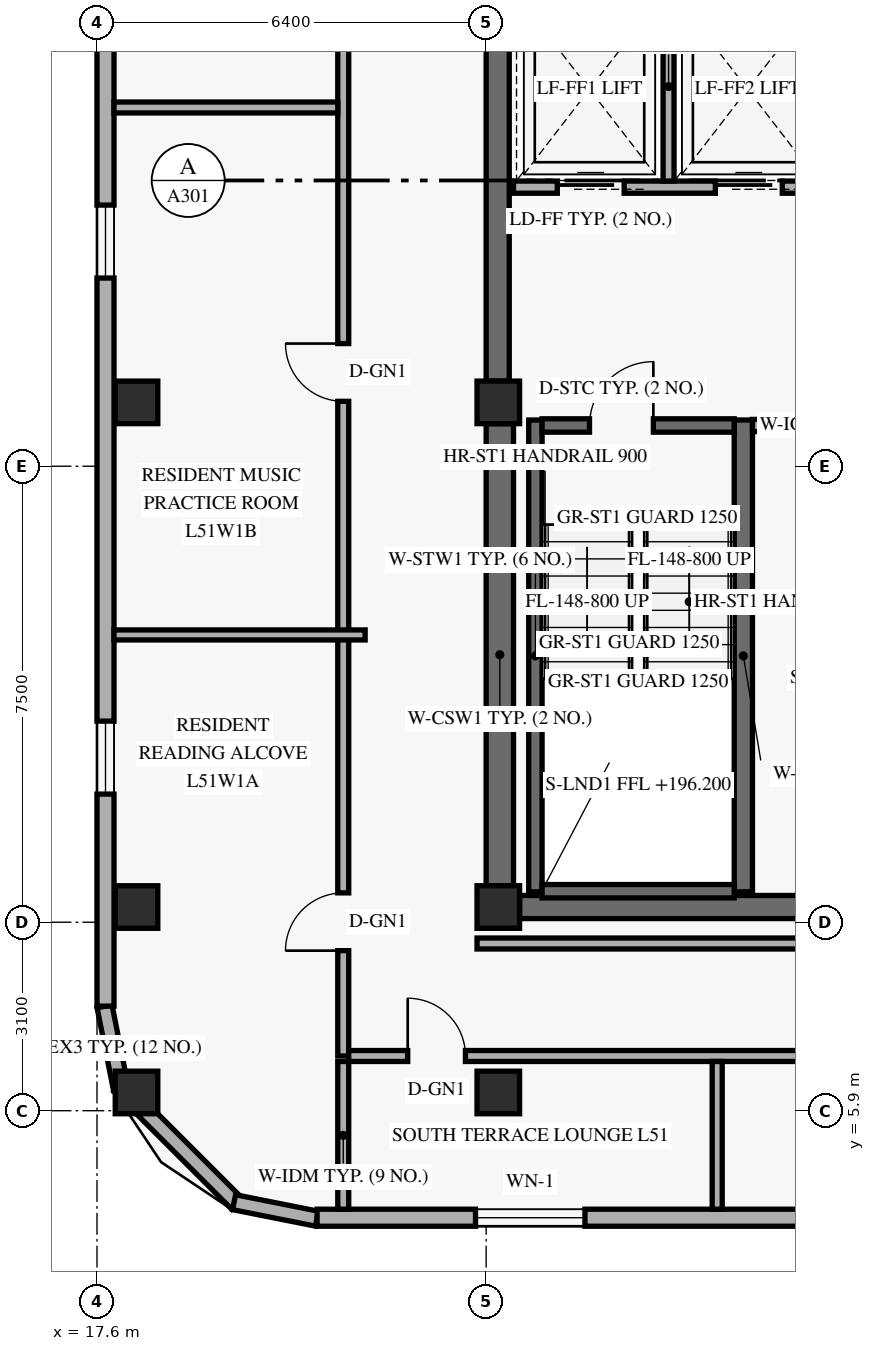
"""IFC4 building model, lengths in metres.
Left out: names, types, materials, properties, quantities, classifications, styles, units other than length and angle.
Written with IfcOpenShell. Run it as: python <this file> out.ifc"""

import sys

from ifc_helpers import new_model, si_unit, direction, frame, frame_2d, origin, origin_2d, place, context, subcontext, project, spatial, rectangle, extrude, element, fill, save


model = new_model("IFC4")
c1 = context("Model", 3, precision=1e-05, world=origin(), true_north=direction((0.0, 1.0)))
c2 = subcontext(c1, "Body", "Model", "MODEL_VIEW")
j1 = project(units=[si_unit("LENGTHUNIT", "METRE"), si_unit("PLANEANGLEUNIT", "RADIAN")], contexts=[c1])
p1 = place(None, origin())
s1 = spatial("IfcSite", under=j1, at=p1, CompositionType="ELEMENT")
p2 = place(p1, origin())
s2 = spatial("IfcBuilding", under=s1, at=p2, CompositionType="ELEMENT")
p3 = place(p2, frame((0.0, 0.0, 196.2)))
s3 = spatial("IfcBuildingStorey", under=s2, at=p3, CompositionType="ELEMENT", Elevation=196.2)
p4 = place(p3, frame((24.225, 9.6, 0.0), z_axis=(0.0, 0.0, 1.0), x_axis=(0.0, 1.0, 0.0)))
e1 = element("IfcWall", 1, at=p4, inside=s3, PredefinedType="SHEAR", context=c2, shape_type="SweptSolid", body=[
    extrude(rectangle(XDim=7.6, YDim=0.45, at=frame_2d((3.8, 0.0))), origin(), (0.0, 0.0, 1.0), 2.688),
])
p5 = place(p3, frame((24.19, 17.9, 0.0), z_axis=(0.0, 0.0, 1.0), x_axis=(0.0, 1.0, 0.0)))
e2 = element("IfcWall", 2, at=p5, inside=s3, PredefinedType="SHEAR", context=c2, shape_type="SweptSolid", body=[
    extrude(rectangle(XDim=11.95, YDim=0.38, at=frame_2d((5.975, 0.0))), origin(), (0.0, 0.0, 1.0), 2.688),
])
p6 = place(p3, frame((24.55, 9.25, 0.0), z_axis=(0.0, 0.0, 1.0), x_axis=(1.0, 0.0, 0.0)))
e3 = element("IfcWall", 3, at=p6, inside=s3, PredefinedType="SHEAR", context=c2, shape_type="SweptSolid", body=[
    extrude(rectangle(XDim=10.3, YDim=0.38, at=frame_2d((5.15, 0.0))), origin(), (0.0, 0.0, 1.0), 3.3),
])
p7 = place(p6, frame((5.2, 0.0, 0.0)))
e4 = element("IfcOpeningElement", 4, at=p7, cuts=e3, PredefinedType="OPENING", context=c2, shape_type="SweptSolid", body=[
    extrude(rectangle(XDim=1.05, YDim=2.15, at=frame_2d((0.525, 1.075))), frame((0.0, 0.2, 0.0), z_axis=(0.0, -1.0, 0.0), x_axis=(1.0, 0.0, 0.0)), (0.0, 0.0, 1.0), 0.4),
])
p8 = place(p3, frame((24.81, 9.5, 0.0), z_axis=(0.0, 0.0, 1.0), x_axis=(0.0, 1.0, 0.0)))
e5 = element("IfcWall", 5, at=p8, inside=s3, PredefinedType="SHEAR", context=c2, shape_type="SweptSolid", body=[
    extrude(rectangle(XDim=7.76, YDim=0.22, at=frame_2d((3.88, 0.0))), origin(), (0.0, 0.0, 1.0), 3.3),
])
p9 = place(p3, frame((28.23, 9.5, 0.0), z_axis=(0.0, 0.0, 1.0), x_axis=(0.0, 1.0, 0.0)))
e6 = element("IfcWall", 6, at=p9, inside=s3, PredefinedType="SHEAR", context=c2, shape_type="SweptSolid", body=[
    extrude(rectangle(XDim=7.76, YDim=0.3, at=frame_2d((3.88, 0.0))), origin(), (0.0, 0.0, 1.0), 3.3),
])
p10 = place(p3, frame((24.92, 9.51, 0.0), z_axis=(0.0, 0.0, 1.0), x_axis=(1.0, 0.0, 0.0)))
e7 = element("IfcWall", 7, at=p10, inside=s3, PredefinedType="SHEAR", context=c2, shape_type="SweptSolid", body=[
    extrude(rectangle(XDim=3.16, YDim=0.22, at=frame_2d((1.58, 0.0))), origin(), (0.0, 0.0, 1.0), 3.3),
])
p11 = place(p3, frame((24.92, 17.17, 0.0), z_axis=(0.0, 0.0, 1.0), x_axis=(1.0, 0.0, 0.0)))
e8 = element("IfcWall", 8, at=p11, inside=s3, PredefinedType="SHEAR", context=c2, shape_type="SweptSolid", body=[
    extrude(rectangle(XDim=3.16, YDim=0.22, at=frame_2d((1.58, 0.0))), origin(), (0.0, 0.0, 1.0), 3.3),
])
p12 = place(p11, frame((0.78, 0.0, 0.0)))
e9 = element("IfcOpeningElement", 9, at=p12, cuts=e8, PredefinedType="OPENING", context=c2, shape_type="SweptSolid", body=[
    extrude(rectangle(XDim=1.05, YDim=2.15, at=frame_2d((0.525, 1.075))), frame((0.0, 0.12, 0.0), z_axis=(0.0, -1.0, 0.0), x_axis=(1.0, 0.0, 0.0)), (0.0, 0.0, 1.0), 0.24),
])
for number, where, z_axis, x_axis in (
    (10, (18.25, 6.2, 0.0), (0.0, 0.0, 1.0), (1.0, 0.0, 0.0)),
    (11, (18.25, 9.25, 0.0), (0.0, 0.0, 1.0), (1.0, 0.0, 0.0)),
    (12, (18.25, 17.55, 0.0), (0.0, 0.0, 1.0), (1.0, 0.0, 0.0)),
    (13, (24.2, 6.2, 0.0), (0.0, 0.0, 1.0), (1.0, 0.0, 0.0)),
    (14, (24.2, 9.25, 0.0), (0.0, 0.0, 1.0), (1.0, 0.0, 0.0)),
    (15, (24.2, 17.55, 0.0), (0.0, 0.0, 1.0), (1.0, 0.0, 0.0)),
):
    element("IfcColumn", number, at=place(p3, frame(where, z_axis=z_axis, x_axis=x_axis)), inside=s3, PredefinedType="COLUMN", context=c2, shape_type="SweptSolid", body=[
        extrude(rectangle(XDim=0.7, YDim=0.7, at=origin_2d()), origin(), (0.0, 0.0, 1.0), 3.6),
    ])
p13 = place(p3, frame((17.724, 7.616, 0.0), z_axis=(0.0, 0.0, 1.0), x_axis=(0.195135625965, -0.9807762678, 0.0)))
e16 = element("IfcWall", 16, at=p13, inside=s3, PredefinedType="SOLIDWALL", context=c2, shape_type="SweptSolid", body=[
    extrude(rectangle(XDim=1.389, YDim=0.25, at=frame_2d((0.694, 0.0))), origin(), (0.0, 0.0, 1.0), 3.3),
])
p14 = place(p3, frame((17.968, 6.305, 0.0), z_axis=(0.0, 0.0, 1.0), x_axis=(0.707106781187, -0.707106781187, 0.0)))
e17 = element("IfcWall", 17, at=p14, inside=s3, PredefinedType="SOLIDWALL", context=c2, shape_type="SweptSolid", body=[
    extrude(rectangle(XDim=2.739, YDim=0.25, at=frame_2d((1.37, 0.0))), origin(), (0.0, 0.0, 1.0), 3.3),
])
p15 = place(p3, frame((19.854, 4.395, 0.0), z_axis=(0.0, 0.0, 1.0), x_axis=(0.980809899341, -0.19496651342, 0.0)))
e18 = element("IfcWall", 18, at=p15, inside=s3, PredefinedType="SOLIDWALL", context=c2, shape_type="SweptSolid", body=[
    extrude(rectangle(XDim=1.389, YDim=0.25, at=frame_2d((0.694, 0.0))), origin(), (0.0, 0.0, 1.0), 3.3),
])
p16 = place(p3, frame((21.22, 4.14, 0.0), z_axis=(0.0, 0.0, 1.0), x_axis=(1.0, 0.0, 0.0)))
e19 = element("IfcWall", 19, at=p16, inside=s3, PredefinedType="SOLIDWALL", context=c2, shape_type="SweptSolid", body=[
    extrude(rectangle(XDim=33.76, YDim=0.28, at=frame_2d((16.88, 0.0))), origin(), (0.0, 0.0, 1.0), 3.3),
])
p17 = place(p16, frame((2.605, 0.0, 0.85)))
e20 = element("IfcOpeningElement", 20, at=p17, cuts=e19, PredefinedType="OPENING", context=c2, shape_type="SweptSolid", body=[
    extrude(rectangle(XDim=1.8, YDim=1.6, at=frame_2d((0.9, 0.8))), frame((0.0, 0.15, 0.0), z_axis=(0.0, -1.0, 0.0), x_axis=(1.0, 0.0, 0.0)), (0.0, 0.0, 1.0), 0.3),
])
p18 = place(p16, frame((9.49, 0.0, 0.85)))
e21 = element("IfcOpeningElement", 21, at=p18, cuts=e19, PredefinedType="OPENING", context=c2, shape_type="SweptSolid", body=[
    extrude(rectangle(XDim=1.8, YDim=1.6, at=frame_2d((0.9, 0.8))), frame((0.0, 0.15, 0.0), z_axis=(0.0, -1.0, 0.0), x_axis=(1.0, 0.0, 0.0)), (0.0, 0.0, 1.0), 0.3),
])
p19 = place(p16, frame((14.765, 0.0, 0.85)))
e22 = element("IfcOpeningElement", 22, at=p19, cuts=e19, PredefinedType="OPENING", context=c2, shape_type="SweptSolid", body=[
    extrude(rectangle(XDim=1.8, YDim=1.6, at=frame_2d((0.9, 0.8))), frame((0.0, 0.15, 0.0), z_axis=(0.0, -1.0, 0.0), x_axis=(1.0, 0.0, 0.0)), (0.0, 0.0, 1.0), 0.3),
])
p20 = place(p16, frame((19.16, 0.0, 0.85)))
e23 = element("IfcOpeningElement", 23, at=p20, cuts=e19, PredefinedType="OPENING", context=c2, shape_type="SweptSolid", body=[
    extrude(rectangle(XDim=1.8, YDim=1.6, at=frame_2d((0.9, 0.8))), frame((0.0, 0.15, 0.0), z_axis=(0.0, -1.0, 0.0), x_axis=(1.0, 0.0, 0.0)), (0.0, 0.0, 1.0), 0.3),
])
p21 = place(p16, frame((24.585, 0.0, 0.85)))
e24 = element("IfcOpeningElement", 24, at=p21, cuts=e19, PredefinedType="OPENING", context=c2, shape_type="SweptSolid", body=[
    extrude(rectangle(XDim=1.8, YDim=1.6, at=frame_2d((0.9, 0.8))), frame((0.0, 0.15, 0.0), z_axis=(0.0, -1.0, 0.0), x_axis=(1.0, 0.0, 0.0)), (0.0, 0.0, 1.0), 0.3),
])
p22 = place(p16, frame((28.28, 0.0, 0.85)))
e25 = element("IfcOpeningElement", 25, at=p22, cuts=e19, PredefinedType="OPENING", context=c2, shape_type="SweptSolid", body=[
    extrude(rectangle(XDim=1.2, YDim=1.5, at=frame_2d((0.6, 0.75))), frame((0.0, 0.15, 0.0), z_axis=(0.0, -1.0, 0.0), x_axis=(1.0, 0.0, 0.0)), (0.0, 0.0, 1.0), 0.3),
])
p23 = place(p16, frame((30.87, 0.0, 0.85)))
e26 = element("IfcOpeningElement", 26, at=p23, cuts=e19, PredefinedType="OPENING", context=c2, shape_type="SweptSolid", body=[
    extrude(rectangle(XDim=1.8, YDim=1.6, at=frame_2d((0.9, 0.8))), frame((0.0, 0.15, 0.0), z_axis=(0.0, -1.0, 0.0), x_axis=(1.0, 0.0, 0.0)), (0.0, 0.0, 1.0), 0.3),
])
p24 = place(p3, frame((17.74, 40.38, 0.0), z_axis=(0.0, 0.0, 1.0), x_axis=(0.0, -1.0, 0.0)))
e27 = element("IfcWall", 27, at=p24, inside=s3, PredefinedType="SOLIDWALL", context=c2, shape_type="SweptSolid", body=[
    extrude(rectangle(XDim=32.76, YDim=0.28, at=frame_2d((16.38, 0.0))), origin(), (0.0, 0.0, 1.0), 3.3),
])
p25 = place(p24, frame((28.073, 0.0, 0.85)))
e28 = element("IfcOpeningElement", 28, at=p25, cuts=e27, PredefinedType="OPENING", context=c2, shape_type="SweptSolid", body=[
    extrude(rectangle(XDim=1.2, YDim=1.5, at=frame_2d((0.6, 0.75))), frame((0.0, 0.15, 0.0), z_axis=(0.0, -1.0, 0.0), x_axis=(1.0, 0.0, 0.0)), (0.0, 0.0, 1.0), 0.3),
])
p26 = place(p24, frame((19.585, 0.0, 0.85)))
e29 = element("IfcOpeningElement", 29, at=p26, cuts=e27, PredefinedType="OPENING", context=c2, shape_type="SweptSolid", body=[
    extrude(rectangle(XDim=1.2, YDim=1.5, at=frame_2d((0.6, 0.75))), frame((0.0, 0.15, 0.0), z_axis=(0.0, -1.0, 0.0), x_axis=(1.0, 0.0, 0.0)), (0.0, 0.0, 1.0), 0.3),
])
p27 = place(p24, frame((13.7, 0.0, 0.85)))
e30 = element("IfcOpeningElement", 30, at=p27, cuts=e27, PredefinedType="OPENING", context=c2, shape_type="SweptSolid", body=[
    extrude(rectangle(XDim=1.2, YDim=1.5, at=frame_2d((0.6, 0.75))), frame((0.0, 0.15, 0.0), z_axis=(0.0, -1.0, 0.0), x_axis=(1.0, 0.0, 0.0)), (0.0, 0.0, 1.0), 0.3),
])
p28 = place(p24, frame((4.288, 0.0, 0.85)))
e31 = element("IfcOpeningElement", 31, at=p28, cuts=e27, PredefinedType="OPENING", context=c2, shape_type="SweptSolid", body=[
    extrude(rectangle(XDim=1.2, YDim=1.5, at=frame_2d((0.6, 0.75))), frame((0.0, 0.15, 0.0), z_axis=(0.0, -1.0, 0.0), x_axis=(1.0, 0.0, 0.0)), (0.0, 0.0, 1.0), 0.3),
])
p29 = place(p3, frame((24.45, 21.09, 0.0), z_axis=(0.0, 0.0, 1.0), x_axis=(1.0, 0.0, 0.0)))
e32 = element("IfcWall", 32, at=p29, inside=s3, PredefinedType="STANDARD", context=c2, shape_type="SweptSolid", body=[
    extrude(rectangle(XDim=6.83, YDim=0.2, at=frame_2d((3.415, 0.0))), origin(), (0.0, 0.0, 1.0), 3.3),
])
p30 = place(p29, frame((0.72, 0.0, 0.0)))
e33 = element("IfcOpeningElement", 33, at=p30, cuts=e32, PredefinedType="OPENING", context=c2, shape_type="SweptSolid", body=[
    extrude(rectangle(XDim=1.1, YDim=2.2, at=frame_2d((0.55, 1.1))), frame((0.0, 0.11, 0.0), z_axis=(0.0, -1.0, 0.0), x_axis=(1.0, 0.0, 0.0)), (0.0, 0.0, 1.0), 0.22),
])
p31 = place(p29, frame((3.32, 0.0, 0.0)))
e34 = element("IfcOpeningElement", 34, at=p31, cuts=e32, PredefinedType="OPENING", context=c2, shape_type="SweptSolid", body=[
    extrude(rectangle(XDim=1.1, YDim=2.2, at=frame_2d((0.55, 1.1))), frame((0.0, 0.11, 0.0), z_axis=(0.0, -1.0, 0.0), x_axis=(1.0, 0.0, 0.0)), (0.0, 0.0, 1.0), 0.22),
])
p32 = place(p3, frame((28.38, 17.17, 0.0), z_axis=(0.0, 0.0, 1.0), x_axis=(1.0, 0.0, 0.0)))
e35 = element("IfcWall", 35, at=p32, inside=s3, PredefinedType="STANDARD", context=c2, shape_type="SweptSolid", body=[
    extrude(rectangle(XDim=2.9, YDim=0.2, at=frame_2d((1.45, 0.0))), origin(), (0.0, 0.0, 1.0), 3.3),
])
p33 = place(p3, frame((27.0, 21.19, 0.0), z_axis=(0.0, 0.0, 1.0), x_axis=(0.0, 1.0, 0.0)))
e36 = element("IfcWall", 36, at=p33, inside=s3, PredefinedType="STANDARD", context=c2, shape_type="SweptSolid", body=[
    extrude(rectangle(XDim=3.11, YDim=0.18, at=frame_2d((1.555, 0.0))), origin(), (0.0, 0.0, 1.0), 3.3),
])
p34 = place(p3, frame((21.65, 6.8, 0.0), z_axis=(0.0, 0.0, 1.0), x_axis=(0.0, 1.0, 0.0)))
e37 = element("IfcWall", 37, at=p34, inside=s3, PredefinedType="STANDARD", context=c2, shape_type="SweptSolid", body=[
    extrude(rectangle(XDim=34.4, YDim=0.18, at=frame_2d((17.2, 0.0))), origin(), (0.0, 0.0, 1.0), 2.67),
])
p35 = place(p34, frame((1.732, 0.0, 0.0)))
e38 = element("IfcOpeningElement", 38, at=p35, cuts=e37, PredefinedType="OPENING", context=c2, shape_type="SweptSolid", body=[
    extrude(rectangle(XDim=0.95, YDim=2.15, at=frame_2d((0.475, 1.075))), frame((0.0, 0.1, 0.0), z_axis=(0.0, -1.0, 0.0), x_axis=(1.0, 0.0, 0.0)), (0.0, 0.0, 1.0), 0.2),
])
p36 = place(p34, frame((10.768, 0.0, 0.0)))
e39 = element("IfcOpeningElement", 39, at=p36, cuts=e37, PredefinedType="OPENING", context=c2, shape_type="SweptSolid", body=[
    extrude(rectangle(XDim=0.95, YDim=2.15, at=frame_2d((0.475, 1.075))), frame((0.0, 0.1, 0.0), z_axis=(0.0, -1.0, 0.0), x_axis=(1.0, 0.0, 0.0)), (0.0, 0.0, 1.0), 0.2),
])
p37 = place(p34, frame((20.333, 0.0, 0.0)))
e40 = element("IfcOpeningElement", 40, at=p37, cuts=e37, PredefinedType="OPENING", context=c2, shape_type="SweptSolid", body=[
    extrude(rectangle(XDim=0.95, YDim=2.15, at=frame_2d((0.475, 1.075))), frame((0.0, 0.1, 0.0), z_axis=(0.0, -1.0, 0.0), x_axis=(1.0, 0.0, 0.0)), (0.0, 0.0, 1.0), 0.2),
])
p38 = place(p34, frame((30.968, 0.0, 0.0)))
e41 = element("IfcOpeningElement", 41, at=p38, cuts=e37, PredefinedType="OPENING", context=c2, shape_type="SweptSolid", body=[
    extrude(rectangle(XDim=0.95, YDim=2.15, at=frame_2d((0.475, 1.075))), frame((0.0, 0.1, 0.0), z_axis=(0.0, -1.0, 0.0), x_axis=(1.0, 0.0, 0.0)), (0.0, 0.0, 1.0), 0.2),
])
p39 = place(p3, frame((21.74, 6.8, 0.0), z_axis=(0.0, 0.0, 1.0), x_axis=(1.0, 0.0, 0.0)))
e42 = element("IfcWall", 42, at=p39, inside=s3, PredefinedType="STANDARD", context=c2, shape_type="SweptSolid", body=[
    extrude(rectangle(XDim=13.68, YDim=0.18, at=frame_2d((6.84, 0.0))), origin(), (0.0, 0.0, 1.0), 2.67),
])
p40 = place(p39, frame((0.97, 0.0, 0.0)))
e43 = element("IfcOpeningElement", 43, at=p40, cuts=e42, PredefinedType="OPENING", context=c2, shape_type="SweptSolid", body=[
    extrude(rectangle(XDim=0.95, YDim=2.15, at=frame_2d((0.475, 1.075))), frame((0.0, 0.1, 0.0), z_axis=(0.0, -1.0, 0.0), x_axis=(1.0, 0.0, 0.0)), (0.0, 0.0, 1.0), 0.2),
])
p41 = place(p39, frame((9.11, 0.0, 0.0)))
e44 = element("IfcOpeningElement", 44, at=p41, cuts=e42, PredefinedType="OPENING", context=c2, shape_type="SweptSolid", body=[
    extrude(rectangle(XDim=0.95, YDim=2.15, at=frame_2d((0.475, 1.075))), frame((0.0, 0.1, 0.0), z_axis=(0.0, -1.0, 0.0), x_axis=(1.0, 0.0, 0.0)), (0.0, 0.0, 1.0), 0.2),
])
p42 = place(p3, frame((23.85, 8.65, 0.0), z_axis=(0.0, 0.0, 1.0), x_axis=(1.0, 0.0, 0.0)))
e45 = element("IfcWall", 45, at=p42, inside=s3, PredefinedType="STANDARD", context=c2, shape_type="SweptSolid", body=[
    extrude(rectangle(XDim=11.57, YDim=0.18, at=frame_2d((5.785, 0.0))), origin(), (0.0, 0.0, 1.0), 2.67),
])
p43 = place(p3, frame((21.65, 4.28, 0.0), z_axis=(0.0, 0.0, 1.0), x_axis=(0.0, 1.0, 0.0)))
e46 = element("IfcWall", 46, at=p43, inside=s3, PredefinedType="PARTITIONING", context=c2, shape_type="SweptSolid", body=[
    extrude(rectangle(XDim=2.43, YDim=0.18, at=frame_2d((1.215, 0.0))), origin(), (0.0, 0.0, 1.0), 2.819),
])
p44 = place(p3, frame((17.88, 13.725, 0.0), z_axis=(0.0, 0.0, 1.0), x_axis=(1.0, 0.0, 0.0)))
e47 = element("IfcWall", 47, at=p44, inside=s3, PredefinedType="PARTITIONING", context=c2, shape_type="SweptSolid", body=[
    extrude(rectangle(XDim=4.13, YDim=0.165, at=frame_2d((2.065, 0.0))), origin(), (0.0, 0.0, 1.0), 2.819),
])
p45 = place(p3, frame((17.88, 22.4, 0.0), z_axis=(0.0, 0.0, 1.0), x_axis=(1.0, 0.0, 0.0)))
e48 = element("IfcWall", 48, at=p45, inside=s3, PredefinedType="PARTITIONING", context=c2, shape_type="SweptSolid", body=[
    extrude(rectangle(XDim=3.68, YDim=0.18, at=frame_2d((1.84, 0.0))), origin(), (0.0, 0.0, 1.0), 2.819),
])
p46 = place(p3, frame((27.8, 4.28, 0.0), z_axis=(0.0, 0.0, 1.0), x_axis=(0.0, 1.0, 0.0)))
e49 = element("IfcWall", 49, at=p46, inside=s3, PredefinedType="PARTITIONING", context=c2, shape_type="SweptSolid", body=[
    extrude(rectangle(XDim=2.43, YDim=0.165, at=frame_2d((1.215, 0.0))), origin(), (0.0, 0.0, 1.0), 2.819),
])
p47 = place(p17, origin())
e50 = element("IfcWindow", 50, at=p47, inside=s3, PartitioningType="SINGLE_PANEL", PredefinedType="WINDOW", context=c2, shape_type="SweptSolid", body=[
    extrude(rectangle(XDim=1.8, YDim=1.6, at=frame_2d((0.9, 0.8))), frame((0.0, 0.03, 0.0), z_axis=(0.0, -1.0, 0.0), x_axis=(1.0, 0.0, 0.0)), (0.0, 0.0, 1.0), 0.06),
])
fill(e20, e50)
p48 = place(p25, origin())
e51 = element("IfcWindow", 51, at=p48, inside=s3, PartitioningType="SINGLE_PANEL", PredefinedType="WINDOW", context=c2, shape_type="SweptSolid", body=[
    extrude(rectangle(XDim=1.2, YDim=1.5, at=frame_2d((0.6, 0.75))), frame((0.0, 0.03, 0.0), z_axis=(0.0, -1.0, 0.0), x_axis=(1.0, 0.0, 0.0)), (0.0, 0.0, 1.0), 0.06),
])
fill(e28, e51)
p49 = place(p26, origin())
e52 = element("IfcWindow", 52, at=p49, inside=s3, PartitioningType="SINGLE_PANEL", PredefinedType="WINDOW", context=c2, shape_type="SweptSolid", body=[
    extrude(rectangle(XDim=1.2, YDim=1.5, at=frame_2d((0.6, 0.75))), frame((0.0, 0.03, 0.0), z_axis=(0.0, -1.0, 0.0), x_axis=(1.0, 0.0, 0.0)), (0.0, 0.0, 1.0), 0.06),
])
fill(e29, e52)
p50 = place(p12, frame((1.05, 0.0, 0.0), z_axis=(0.0, 0.0, 1.0), x_axis=(-1.0, 0.0, 0.0)))
e53 = element("IfcDoor", 53, at=p50, inside=s3, OperationType="SINGLE_SWING_LEFT", PredefinedType="DOOR", context=c2, shape_type="SweptSolid", body=[
    extrude(rectangle(XDim=1.05, YDim=2.15, at=frame_2d((0.525, 1.075))), frame((0.0, 0.025, 0.0), z_axis=(0.0, -1.0, 0.0), x_axis=(1.0, 0.0, 0.0)), (0.0, 0.0, 1.0), 0.05),
])
fill(e9, e53)
p51 = place(p30, origin())
e54 = element("IfcDoor", 54, at=p51, inside=s3, OperationType="SLIDING_TO_LEFT", PredefinedType="DOOR", context=c2, shape_type="SweptSolid", body=[
    extrude(rectangle(XDim=1.1, YDim=2.2, at=frame_2d((0.55, 1.1))), frame((0.0, 0.025, 0.0), z_axis=(0.0, -1.0, 0.0), x_axis=(1.0, 0.0, 0.0)), (0.0, 0.0, 1.0), 0.05),
])
fill(e33, e54)
p52 = place(p31, origin())
e55 = element("IfcDoor", 55, at=p52, inside=s3, OperationType="SLIDING_TO_LEFT", PredefinedType="DOOR", context=c2, shape_type="SweptSolid", body=[
    extrude(rectangle(XDim=1.1, YDim=2.2, at=frame_2d((0.55, 1.1))), frame((0.0, 0.025, 0.0), z_axis=(0.0, -1.0, 0.0), x_axis=(1.0, 0.0, 0.0)), (0.0, 0.0, 1.0), 0.05),
])
fill(e34, e55)
p53 = place(p35, origin())
e56 = element("IfcDoor", 56, at=p53, inside=s3, OperationType="SINGLE_SWING_LEFT", PredefinedType="DOOR", context=c2, shape_type="SweptSolid", body=[
    extrude(rectangle(XDim=0.95, YDim=2.15, at=frame_2d((0.475, 1.075))), frame((0.0, 0.025, 0.0), z_axis=(0.0, -1.0, 0.0), x_axis=(1.0, 0.0, 0.0)), (0.0, 0.0, 1.0), 0.05),
])
fill(e38, e56)
p54 = place(p36, origin())
e57 = element("IfcDoor", 57, at=p54, inside=s3, OperationType="SINGLE_SWING_RIGHT", PredefinedType="DOOR", context=c2, shape_type="SweptSolid", body=[
    extrude(rectangle(XDim=0.95, YDim=2.15, at=frame_2d((0.475, 1.075))), frame((0.0, 0.025, 0.0), z_axis=(0.0, -1.0, 0.0), x_axis=(1.0, 0.0, 0.0)), (0.0, 0.0, 1.0), 0.05),
])
fill(e39, e57)
p55 = place(p40, origin())
e58 = element("IfcDoor", 58, at=p55, inside=s3, OperationType="SINGLE_SWING_LEFT", PredefinedType="DOOR", context=c2, shape_type="SweptSolid", body=[
    extrude(rectangle(XDim=0.95, YDim=2.15, at=frame_2d((0.475, 1.075))), frame((0.0, 0.025, 0.0), z_axis=(0.0, -1.0, 0.0), x_axis=(1.0, 0.0, 0.0)), (0.0, 0.0, 1.0), 0.05),
])
fill(e43, e58)
save(model, sys.argv[1])
